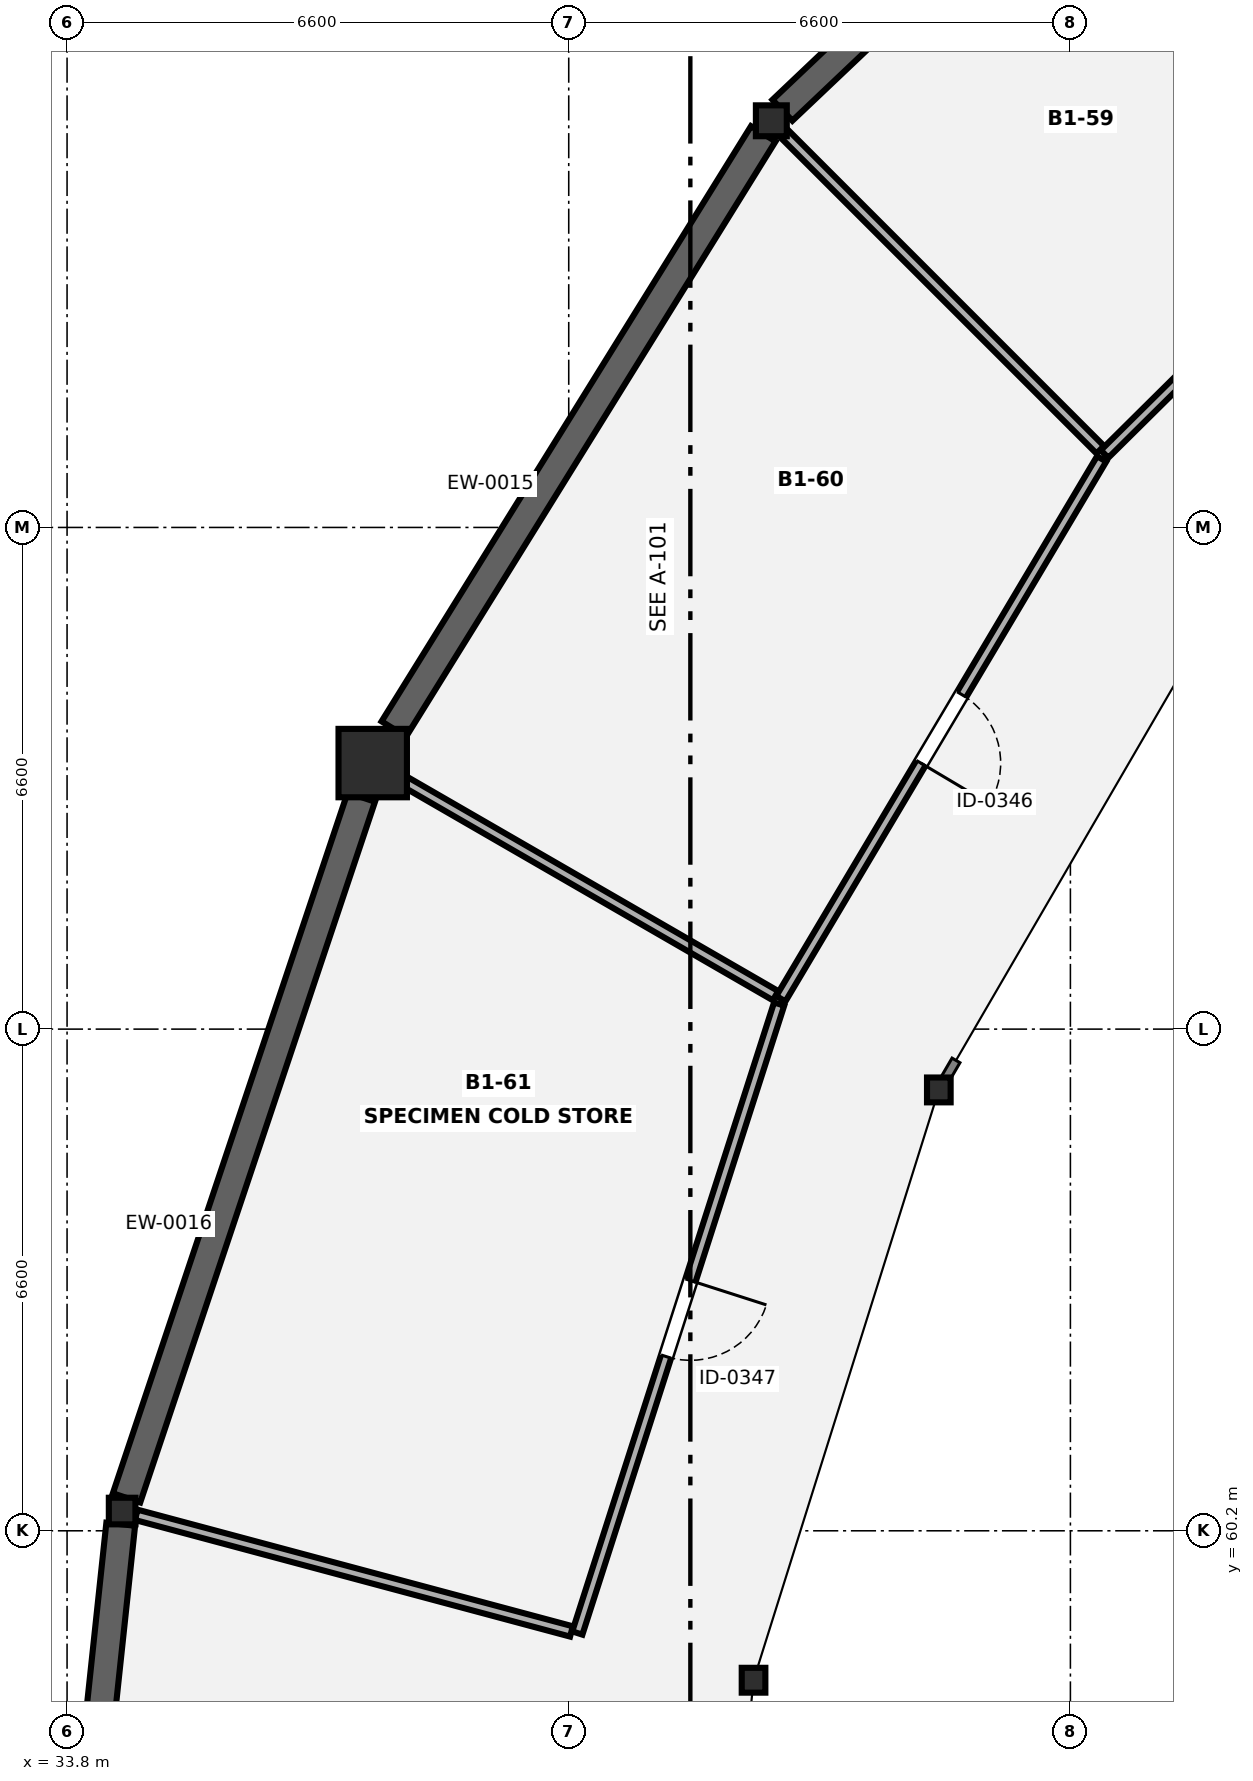
"""IFC4 building model, lengths in metres.
Left out: names, types, materials, properties, quantities, classifications, styles, units other than length and angle.
Written with IfcOpenShell. Run it as: python <this file> out.ifc"""

import sys

from ifc_helpers import new_model, si_unit, direction, frame, frame_2d, origin, origin_2d, place, context, subcontext, project, spatial, rectangle, hollow_circle, i_section, extrude, element, fill, save


model = new_model("IFC4")
c1 = context("Model", 3, precision=1e-05, world=origin(), true_north=direction((0.0, 1.0)))
c2 = subcontext(c1, "Body", "Model", "MODEL_VIEW")
j1 = project(units=[si_unit("LENGTHUNIT", "METRE"), si_unit("PLANEANGLEUNIT", "RADIAN")], contexts=[c1])
p1 = place(None, origin())
s1 = spatial("IfcSite", under=j1, at=p1, CompositionType="ELEMENT")
p2 = place(p1, origin())
s2 = spatial("IfcBuilding", under=s1, at=p2, CompositionType="ELEMENT")
p3 = place(p2, frame((0.0, 0.0, -4.2)))
s3 = spatial("IfcBuildingStorey", under=s2, at=p3, CompositionType="ELEMENT", Elevation=-4.2)
p4 = place(p3, frame((43.065, 78.75, 0.0), z_axis=(0.0, 0.0, 1.0), x_axis=(1.0, 0.0, 0.0)))
e1 = element("IfcColumn", 1, at=p4, inside=s3, PredefinedType="COLUMN", context=c2, shape_type="SweptSolid", body=[
    extrude(hollow_circle(Radius=0.203, WallThickness=0.013, at=origin_2d()), origin(), (0.0, 0.0, 1.0), 4.2),
])
p5 = place(p3, frame((37.821, 70.3, 0.0), z_axis=(0.0, 0.0, 1.0), x_axis=(1.0, 0.0, 0.0)))
e2 = element("IfcColumn", 2, at=p5, inside=s3, PredefinedType="COLUMN", context=c2, shape_type="SweptSolid", body=[
    extrude(rectangle(XDim=0.9, YDim=0.9, at=origin_2d()), origin(), (0.0, 0.0, 1.0), 4.2),
])
p6 = place(p3, frame((45.269, 66.0, 0.0), z_axis=(0.0, 0.0, 1.0), x_axis=(1.0, 0.0, 0.0)))
e3 = element("IfcColumn", 3, at=p6, inside=s3, PredefinedType="COLUMN", context=c2, shape_type="SweptSolid", body=[
    extrude(i_section(OverallWidth=0.311, OverallDepth=0.327, WebThickness=0.016, FlangeThickness=0.025, FilletRadius=0.017, at=origin_2d()), origin(), (0.0, 0.0, 1.0), 4.2),
])
p7 = place(p3, frame((34.524, 60.46, 0.0), z_axis=(0.0, 0.0, 1.0), x_axis=(1.0, 0.0, 0.0)))
e4 = element("IfcColumn", 4, at=p7, inside=s3, PredefinedType="COLUMN", context=c2, shape_type="SweptSolid", body=[
    extrude(i_section(OverallWidth=0.35, OverallDepth=0.35, WebThickness=0.02, FlangeThickness=0.032, FilletRadius=0.016, at=origin_2d()), origin(), (0.0, 0.0, 1.0), 4.2),
])
p8 = place(p3, frame((42.831, 58.234, 0.0), z_axis=(0.0, 0.0, 1.0), x_axis=(1.0, 0.0, 0.0)))
e5 = element("IfcColumn", 5, at=p8, inside=s3, PredefinedType="COLUMN", context=c2, shape_type="SweptSolid", body=[
    extrude(i_section(OverallWidth=0.311, OverallDepth=0.327, WebThickness=0.016, FlangeThickness=0.025, FilletRadius=0.017, at=origin_2d()), origin(), (0.0, 0.0, 1.0), 4.2),
])
p9 = place(p3, frame((43.211, 78.888, 0.0), z_axis=(0.0, 0.0, 1.0), x_axis=(0.725483885401, 0.688239153219, 0.0)))
e6 = element("IfcWall", 6, at=p9, inside=s3, PredefinedType="USERDEFINED", context=c2, shape_type="SweptSolid", body=[
    extrude(rectangle(XDim=8.98, YDim=0.38, at=frame_2d((4.49, 0.0))), origin(), (0.0, 0.0, 1.0), 3.9),
])
p10 = place(p3, frame((38.099, 70.748, 0.0), z_axis=(0.0, 0.0, 1.0), x_axis=(0.527331869532, 0.849659401982, 0.0)))
e7 = element("IfcWall", 7, at=p10, inside=s3, PredefinedType="USERDEFINED", context=c2, shape_type="SweptSolid", body=[
    extrude(rectangle(XDim=9.216, YDim=0.38, at=frame_2d((4.608, 0.0))), origin(), (0.0, 0.0, 1.0), 3.9),
])
p11 = place(p3, frame((34.583, 60.633, 0.0), z_axis=(0.0, 0.0, 1.0), x_axis=(0.317673767079, 0.948200072616, 0.0)))
e8 = element("IfcWall", 8, at=p11, inside=s3, PredefinedType="USERDEFINED", context=c2, shape_type="SweptSolid", body=[
    extrude(rectangle(XDim=9.723, YDim=0.38, at=frame_2d((4.861, 0.0))), origin(), (0.0, 0.0, 1.0), 3.9),
])
p12 = place(p3, frame((33.421, 50.1, 0.0), z_axis=(0.0, 0.0, 1.0), x_axis=(0.105884325246, 0.994378453944, 0.0)))
e9 = element("IfcWall", 9, at=p12, inside=s3, PredefinedType="USERDEFINED", context=c2, shape_type="SweptSolid", body=[
    extrude(rectangle(XDim=10.244, YDim=0.38, at=frame_2d((5.122, 0.0))), origin(), (0.0, 0.0, 1.0), 3.9),
])
p13 = place(p3, frame((52.999, 79.863, 0.0), z_axis=(0.0, 0.0, 1.0), x_axis=(-0.710427757183, -0.703770134222, 0.0)))
e10 = element("IfcWall", 10, at=p13, inside=s3, PredefinedType="PARTITIONING", context=c2, shape_type="SweptSolid", body=[
    extrude(rectangle(XDim=7.811, YDim=0.14, at=frame_2d((3.905, 0.0))), origin(), (0.0, 0.0, 1.0), 3.94),
])
p14 = place(p13, frame((3.381, 0.0, 0.0)))
e11 = element("IfcOpeningElement", 11, at=p14, cuts=e10, PredefinedType="OPENING", context=c2, shape_type="SweptSolid", body=[
    extrude(rectangle(XDim=1.05, YDim=2.15, at=frame_2d((0.525, 1.075))), frame((0.0, 0.08, 0.0), z_axis=(0.0, -1.0, 0.0), x_axis=(1.0, 0.0, 0.0)), (0.0, 0.0, 1.0), 0.16),
])
p15 = place(p3, frame((47.393, 74.423, 0.0), z_axis=(0.0, 0.0, 1.0), x_axis=(-0.707086187743, 0.707127374031, 0.0)))
e12 = element("IfcWall", 12, at=p15, inside=s3, PredefinedType="PARTITIONING", context=c2, shape_type="SweptSolid", body=[
    extrude(rectangle(XDim=5.928, YDim=0.14, at=frame_2d((2.964, 0.0))), origin(), (0.0, 0.0, 1.0), 3.323),
])
p16 = place(p3, frame((47.412, 74.302, 0.0), z_axis=(0.0, 0.0, 1.0), x_axis=(-0.51092787214, -0.85962358592, 0.0)))
e13 = element("IfcWall", 13, at=p16, inside=s3, PredefinedType="PARTITIONING", context=c2, shape_type="SweptSolid", body=[
    extrude(rectangle(XDim=8.262, YDim=0.14, at=frame_2d((4.131, 0.0))), origin(), (0.0, 0.0, 1.0), 3.94),
])
p17 = place(p16, frame((3.606, 0.0, 0.0)))
e14 = element("IfcOpeningElement", 14, at=p17, cuts=e13, PredefinedType="OPENING", context=c2, shape_type="SweptSolid", body=[
    extrude(rectangle(XDim=1.05, YDim=2.15, at=frame_2d((0.525, 1.075))), frame((0.0, 0.08, 0.0), z_axis=(0.0, -1.0, 0.0), x_axis=(1.0, 0.0, 0.0)), (0.0, 0.0, 1.0), 0.16),
])
p18 = place(p3, frame((43.121, 67.24, 0.0), z_axis=(0.0, 0.0, 1.0), x_axis=(-0.866006572617, 0.500032615121, 0.0)))
e15 = element("IfcWall", 15, at=p18, inside=s3, PredefinedType="PARTITIONING", context=c2, shape_type="SweptSolid", body=[
    extrude(rectangle(XDim=5.928, YDim=0.14, at=frame_2d((2.964, 0.0))), origin(), (0.0, 0.0, 1.0), 3.392),
])
p19 = place(p3, frame((43.168, 67.13, 0.0), z_axis=(0.0, 0.0, 1.0), x_axis=(-0.305487150125, -0.952196198852, 0.0)))
e16 = element("IfcWall", 16, at=p19, inside=s3, PredefinedType="PARTITIONING", context=c2, shape_type="SweptSolid", body=[
    extrude(rectangle(XDim=8.69, YDim=0.14, at=frame_2d((4.345, 0.0))), origin(), (0.0, 0.0, 1.0), 3.94),
])
p20 = place(p19, frame((3.82, 0.0, 0.0)))
e17 = element("IfcOpeningElement", 17, at=p20, cuts=e16, PredefinedType="OPENING", context=c2, shape_type="SweptSolid", body=[
    extrude(rectangle(XDim=1.05, YDim=2.15, at=frame_2d((0.525, 1.075))), frame((0.0, 0.08, 0.0), z_axis=(0.0, -1.0, 0.0), x_axis=(1.0, 0.0, 0.0)), (0.0, 0.0, 1.0), 0.16),
])
p21 = place(p3, frame((40.436, 58.876, 0.0), z_axis=(0.0, 0.0, 1.0), x_axis=(-0.96592525441, 0.258821179375, 0.0)))
e18 = element("IfcWall", 18, at=p21, inside=s3, PredefinedType="PARTITIONING", context=c2, shape_type="SweptSolid", body=[
    extrude(rectangle(XDim=5.927, YDim=0.14, at=frame_2d((2.964, 0.0))), origin(), (0.0, 0.0, 1.0), 3.392),
])
p22 = place(p17, origin())
e19 = element("IfcDoor", 19, at=p22, inside=s3, OperationType="SINGLE_SWING_RIGHT", PredefinedType="DOOR", context=c2, shape_type="SweptSolid", body=[
    extrude(rectangle(XDim=1.05, YDim=2.15, at=frame_2d((0.525, 1.075))), frame((0.0, 0.025, 0.0), z_axis=(0.0, -1.0, 0.0), x_axis=(1.0, 0.0, 0.0)), (0.0, 0.0, 1.0), 0.05),
])
fill(e14, e19)
p23 = place(p20, origin())
e20 = element("IfcDoor", 20, at=p23, inside=s3, OperationType="SINGLE_SWING_LEFT", PredefinedType="DOOR", context=c2, shape_type="SweptSolid", body=[
    extrude(rectangle(XDim=1.05, YDim=2.15, at=frame_2d((0.525, 1.075))), frame((0.0, 0.025, 0.0), z_axis=(0.0, -1.0, 0.0), x_axis=(1.0, 0.0, 0.0)), (0.0, 0.0, 1.0), 0.05),
])
fill(e17, e20)
save(model, sys.argv[1])
